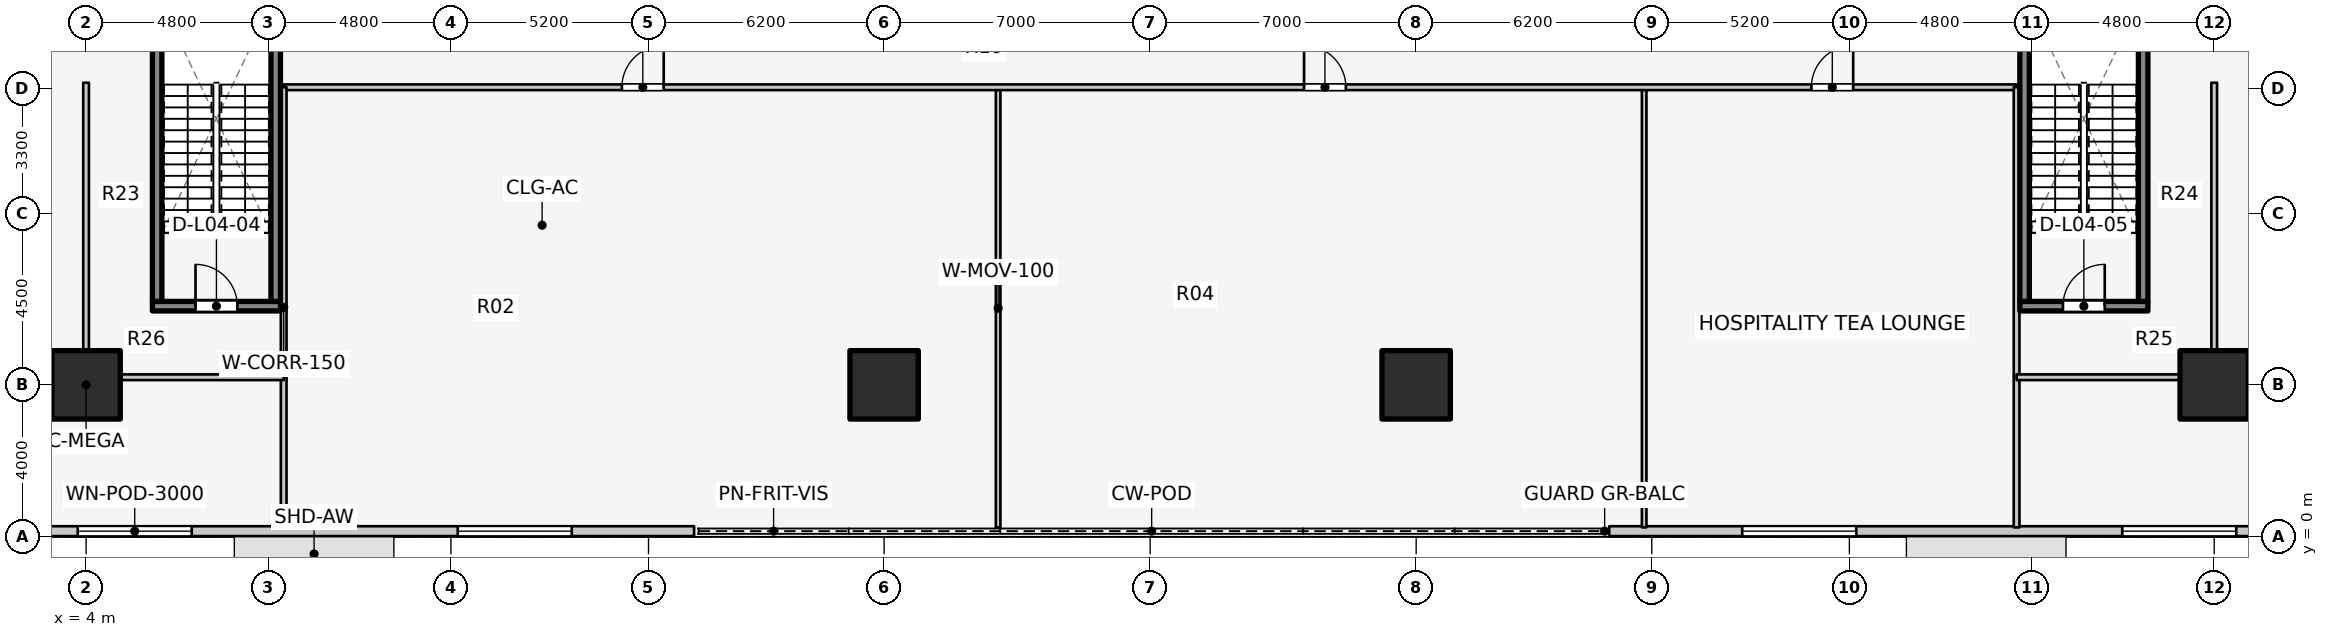
"""IFC4 building model, lengths in metres.
Left out: names, types, materials, properties, quantities, classifications, styles, units other than length and angle.
Written with IfcOpenShell. Run it as: python <this file> out.ifc"""

import sys

from ifc_helpers import new_model, si_unit, direction, frame, frame_2d, origin, origin_2d, place, context, subcontext, project, spatial, rectangle, extrude, element, fill, save


model = new_model("IFC4")
c1 = context("Model", 3, precision=1e-05, world=origin(), true_north=direction((0.0, 1.0)))
c2 = subcontext(c1, "Body", "Model", "MODEL_VIEW")
j1 = project(units=[si_unit("LENGTHUNIT", "METRE"), si_unit("PLANEANGLEUNIT", "RADIAN")], contexts=[c1])
p1 = place(None, origin())
s1 = spatial("IfcSite", under=j1, at=p1, CompositionType="ELEMENT")
p2 = place(p1, origin())
s2 = spatial("IfcBuilding", under=s1, at=p2, CompositionType="ELEMENT")
p3 = place(p2, frame((0.0, 0.0, 13.8)))
s3 = spatial("IfcBuildingStorey", under=s2, at=p3, CompositionType="ELEMENT", Elevation=13.8)
p4 = place(p3, frame((5.745, 6.07, 0.0), z_axis=(0.0, 0.0, 1.0), x_axis=(1.0, 0.0, 0.0)))
e1 = element("IfcWall", 1, at=p4, inside=s3, PredefinedType="SOLIDWALL", context=c2, shape_type="SweptSolid", body=[
    extrude(rectangle(XDim=3.37, YDim=0.25, at=frame_2d((1.685, 0.0))), origin(), (0.0, 0.0, 1.0), 4.6),
])
p5 = place(p4, frame((1.135, 0.0, 0.0)))
e2 = element("IfcOpeningElement", 2, at=p5, cuts=e1, PredefinedType="OPENING", context=c2, shape_type="SweptSolid", body=[
    extrude(rectangle(XDim=1.1, YDim=2.1, at=frame_2d((0.55, 1.05))), frame((0.0, 0.135, 0.0), z_axis=(0.0, -1.0, 0.0), x_axis=(1.0, 0.0, 0.0)), (0.0, 0.0, 1.0), 0.27),
])
for number, where, z_axis, x_axis in (
    (3, (5.87, 6.195, 0.0), (0.0, 0.0, 1.0), (0.0, 1.0, 0.0)),
    (4, (8.99, 6.195, 0.0), (0.0, 0.0, 1.0), (0.0, 1.0, 0.0)),
):
    element("IfcWall", number, at=place(p3, frame(where, z_axis=z_axis, x_axis=x_axis)), inside=s3, PredefinedType="SOLIDWALL", context=c2, shape_type="SweptSolid", body=[
        extrude(rectangle(XDim=7.81, YDim=0.25, at=frame_2d((3.905, 0.0))), origin(), (0.0, 0.0, 1.0), 4.6),
    ])
p6 = place(p3, frame((54.885, 6.07, 0.0), z_axis=(0.0, 0.0, 1.0), x_axis=(1.0, 0.0, 0.0)))
e5 = element("IfcWall", 5, at=p6, inside=s3, PredefinedType="SOLIDWALL", context=c2, shape_type="SweptSolid", body=[
    extrude(rectangle(XDim=3.37, YDim=0.25, at=frame_2d((1.685, 0.0))), origin(), (0.0, 0.0, 1.0), 4.6),
])
p7 = place(p6, frame((1.135, 0.0, 0.0)))
e6 = element("IfcOpeningElement", 6, at=p7, cuts=e5, PredefinedType="OPENING", context=c2, shape_type="SweptSolid", body=[
    extrude(rectangle(XDim=1.1, YDim=2.1, at=frame_2d((0.55, 1.05))), frame((0.0, 0.135, 0.0), z_axis=(0.0, -1.0, 0.0), x_axis=(1.0, 0.0, 0.0)), (0.0, 0.0, 1.0), 0.27),
])
for number, where, z_axis, x_axis in (
    (7, (55.01, 6.195, 0.0), (0.0, 0.0, 1.0), (0.0, 1.0, 0.0)),
    (8, (58.13, 6.195, 0.0), (0.0, 0.0, 1.0), (0.0, 1.0, 0.0)),
):
    element("IfcWall", number, at=place(p3, frame(where, z_axis=z_axis, x_axis=x_axis)), inside=s3, PredefinedType="SOLIDWALL", context=c2, shape_type="SweptSolid", body=[
        extrude(rectangle(XDim=7.81, YDim=0.25, at=frame_2d((3.905, 0.0))), origin(), (0.0, 0.0, 1.0), 4.6),
    ])
for number, where, z_axis, x_axis in (
    (9, (4.0, 4.0, 0.0), (0.0, 0.0, 1.0), (1.0, 0.0, 0.0)),
    (10, (25.0, 4.0, 0.0), (0.0, 0.0, 1.0), (1.0, 0.0, 0.0)),
    (11, (39.0, 4.0, 0.0), (0.0, 0.0, 1.0), (1.0, 0.0, 0.0)),
    (12, (60.0, 4.0, 0.0), (0.0, 0.0, 1.0), (1.0, 0.0, 0.0)),
):
    element("IfcColumn", number, at=place(p3, frame(where, z_axis=z_axis, x_axis=x_axis)), inside=s3, PredefinedType="COLUMN", context=c2, shape_type="SweptSolid", body=[
        extrude(rectangle(XDim=1.8, YDim=1.8, at=origin_2d()), origin(), (0.0, 0.0, 1.0), 4.6),
    ])
p8 = place(p3, frame((0.28, 0.15, 0.0), z_axis=(0.0, 0.0, 1.0), x_axis=(1.0, 0.0, 0.0)))
e13 = element("IfcWall", 13, at=p8, inside=s3, PredefinedType="STANDARD", context=c2, shape_type="SweptSolid", body=[
    extrude(rectangle(XDim=19.72, YDim=0.26, at=frame_2d((9.86, 0.0))), origin(), (0.0, 0.0, 1.0), 4.28),
])
p9 = place(p8, frame((3.5, 0.0, 0.9)))
e14 = element("IfcOpeningElement", 14, at=p9, cuts=e13, PredefinedType="OPENING", context=c2, shape_type="SweptSolid", body=[
    extrude(rectangle(XDim=3.0, YDim=2.4, at=frame_2d((1.5, 1.2))), frame((0.0, 0.14, 0.0), z_axis=(0.0, -1.0, 0.0), x_axis=(1.0, 0.0, 0.0)), (0.0, 0.0, 1.0), 0.28),
])
p10 = place(p8, frame((13.5, 0.0, 0.9)))
e15 = element("IfcOpeningElement", 15, at=p10, cuts=e13, PredefinedType="OPENING", context=c2, shape_type="SweptSolid", body=[
    extrude(rectangle(XDim=3.0, YDim=2.4, at=frame_2d((1.5, 1.2))), frame((0.0, 0.14, 0.0), z_axis=(0.0, -1.0, 0.0), x_axis=(1.0, 0.0, 0.0)), (0.0, 0.0, 1.0), 0.28),
])
p11 = place(p3, frame((44.08, 0.15, 0.0), z_axis=(0.0, 0.0, 1.0), x_axis=(1.0, 0.0, 0.0)))
e16 = element("IfcWall", 16, at=p11, inside=s3, PredefinedType="STANDARD", context=c2, shape_type="SweptSolid", body=[
    extrude(rectangle(XDim=19.64, YDim=0.26, at=frame_2d((9.82, 0.0))), origin(), (0.0, 0.0, 1.0), 4.28),
])
p12 = place(p11, frame((3.5, 0.0, 0.9)))
e17 = element("IfcOpeningElement", 17, at=p12, cuts=e16, PredefinedType="OPENING", context=c2, shape_type="SweptSolid", body=[
    extrude(rectangle(XDim=3.0, YDim=2.4, at=frame_2d((1.5, 1.2))), frame((0.0, 0.14, 0.0), z_axis=(0.0, -1.0, 0.0), x_axis=(1.0, 0.0, 0.0)), (0.0, 0.0, 1.0), 0.28),
])
p13 = place(p11, frame((13.5, 0.0, 0.9)))
e18 = element("IfcOpeningElement", 18, at=p13, cuts=e16, PredefinedType="OPENING", context=c2, shape_type="SweptSolid", body=[
    extrude(rectangle(XDim=3.0, YDim=2.4, at=frame_2d((1.5, 1.2))), frame((0.0, 0.14, 0.0), z_axis=(0.0, -1.0, 0.0), x_axis=(1.0, 0.0, 0.0)), (0.0, 0.0, 1.0), 0.28),
])
for number, where, z_axis, x_axis in (
    (19, (28.0, 0.25, 0.0), (0.0, 0.0, 1.0), (0.0, 1.0, 0.0)),
    (20, (45.0, 0.25, 0.0), (0.0, 0.0, 1.0), (0.0, 1.0, 0.0)),
):
    element("IfcWall", number, at=place(p3, frame(where, z_axis=z_axis, x_axis=x_axis)), inside=s3, PredefinedType="MOVABLE", context=c2, shape_type="SweptSolid", body=[
        extrude(rectangle(XDim=11.53, YDim=0.12, at=frame_2d((5.765, 0.0))), origin(), (0.0, 0.0, 1.0), 3.3),
    ])
p14 = place(p3, frame((9.2, 11.83, 0.0), z_axis=(0.0, 0.0, 1.0), x_axis=(1.0, 0.0, 0.0)))
e21 = element("IfcWall", 21, at=p14, inside=s3, PredefinedType="PARTITIONING", context=c2, shape_type="SweptSolid", body=[
    extrude(rectangle(XDim=45.6, YDim=0.15, at=frame_2d((22.8, 0.0))), origin(), (0.0, 0.0, 1.0), 3.3),
])
p15 = place(p14, frame((8.9, 0.0, 0.0)))
e22 = element("IfcOpeningElement", 22, at=p15, cuts=e21, PredefinedType="OPENING", context=c2, shape_type="SweptSolid", body=[
    extrude(rectangle(XDim=1.1, YDim=2.1, at=frame_2d((0.55, 1.05))), frame((0.0, 0.085, 0.0), z_axis=(0.0, -1.0, 0.0), x_axis=(1.0, 0.0, 0.0)), (0.0, 0.0, 1.0), 0.17),
])
p16 = place(p14, frame((26.85, 0.0, 0.0)))
e23 = element("IfcOpeningElement", 23, at=p16, cuts=e21, PredefinedType="OPENING", context=c2, shape_type="SweptSolid", body=[
    extrude(rectangle(XDim=1.1, YDim=2.1, at=frame_2d((0.55, 1.05))), frame((0.0, 0.085, 0.0), z_axis=(0.0, -1.0, 0.0), x_axis=(1.0, 0.0, 0.0)), (0.0, 0.0, 1.0), 0.17),
])
p17 = place(p14, frame((40.2, 0.0, 0.0)))
e24 = element("IfcOpeningElement", 24, at=p17, cuts=e21, PredefinedType="OPENING", context=c2, shape_type="SweptSolid", body=[
    extrude(rectangle(XDim=1.1, YDim=2.1, at=frame_2d((0.55, 1.05))), frame((0.0, 0.085, 0.0), z_axis=(0.0, -1.0, 0.0), x_axis=(1.0, 0.0, 0.0)), (0.0, 0.0, 1.0), 0.17),
])
for number, where, z_axis, x_axis in (
    (25, (9.2, 0.25, 0.0), (0.0, 0.0, 1.0), (0.0, 1.0, 0.0)),
    (26, (54.8, 0.25, 0.0), (0.0, 0.0, 1.0), (0.0, 1.0, 0.0)),
):
    element("IfcWall", number, at=place(p3, frame(where, z_axis=z_axis, x_axis=x_axis)), inside=s3, PredefinedType="PARTITIONING", context=c2, shape_type="SweptSolid", body=[
        extrude(rectangle(XDim=11.58, YDim=0.15, at=frame_2d((5.79, 0.0))), origin(), (0.0, 0.0, 1.0), 3.3),
    ])
p18 = place(p3, frame((4.0, 4.2, 0.0), z_axis=(0.0, 0.0, 1.0), x_axis=(0.0, 1.0, 0.0)))
e27 = element("IfcWall", 27, at=p18, inside=s3, PredefinedType="PARTITIONING", context=c2, shape_type="SweptSolid", body=[
    extrude(rectangle(XDim=7.75, YDim=0.15, at=frame_2d((3.875, 0.0))), origin(), (0.0, 0.0, 1.0), 3.3),
])
p19 = place(p3, frame((4.0, 4.2, 0.0), z_axis=(0.0, 0.0, 1.0), x_axis=(1.0, 0.0, 0.0)))
e28 = element("IfcWall", 28, at=p19, inside=s3, PredefinedType="PARTITIONING", context=c2, shape_type="SweptSolid", body=[
    extrude(rectangle(XDim=5.2, YDim=0.15, at=frame_2d((2.6, 0.0))), origin(), (0.0, 0.0, 1.0), 3.3),
])
p20 = place(p3, frame((60.0, 4.2, 0.0), z_axis=(0.0, 0.0, 1.0), x_axis=(0.0, 1.0, 0.0)))
e29 = element("IfcWall", 29, at=p20, inside=s3, PredefinedType="PARTITIONING", context=c2, shape_type="SweptSolid", body=[
    extrude(rectangle(XDim=7.75, YDim=0.15, at=frame_2d((3.875, 0.0))), origin(), (0.0, 0.0, 1.0), 3.3),
])
p21 = place(p3, frame((54.8, 4.2, 0.0), z_axis=(0.0, 0.0, 1.0), x_axis=(1.0, 0.0, 0.0)))
e30 = element("IfcWall", 30, at=p21, inside=s3, PredefinedType="PARTITIONING", context=c2, shape_type="SweptSolid", body=[
    extrude(rectangle(XDim=5.2, YDim=0.15, at=frame_2d((2.6, 0.0))), origin(), (0.0, 0.0, 1.0), 3.3),
])
p22 = place(p9, origin())
e31 = element("IfcWindow", 31, at=p22, inside=s3, PartitioningType="SINGLE_PANEL", PredefinedType="WINDOW", context=c2, shape_type="SweptSolid", body=[
    extrude(rectangle(XDim=3.0, YDim=2.4, at=frame_2d((1.5, 1.2))), frame((0.0, 0.03, 0.0), z_axis=(0.0, -1.0, 0.0), x_axis=(1.0, 0.0, 0.0)), (0.0, 0.0, 1.0), 0.06),
])
fill(e14, e31)
p23 = place(p10, origin())
e32 = element("IfcWindow", 32, at=p23, inside=s3, PartitioningType="SINGLE_PANEL", PredefinedType="WINDOW", context=c2, shape_type="SweptSolid", body=[
    extrude(rectangle(XDim=3.0, YDim=2.4, at=frame_2d((1.5, 1.2))), frame((0.0, 0.03, 0.0), z_axis=(0.0, -1.0, 0.0), x_axis=(1.0, 0.0, 0.0)), (0.0, 0.0, 1.0), 0.06),
])
fill(e15, e32)
p24 = place(p12, origin())
e33 = element("IfcWindow", 33, at=p24, inside=s3, PartitioningType="SINGLE_PANEL", PredefinedType="WINDOW", context=c2, shape_type="SweptSolid", body=[
    extrude(rectangle(XDim=3.0, YDim=2.4, at=frame_2d((1.5, 1.2))), frame((0.0, 0.03, 0.0), z_axis=(0.0, -1.0, 0.0), x_axis=(1.0, 0.0, 0.0)), (0.0, 0.0, 1.0), 0.06),
])
fill(e17, e33)
p25 = place(p13, origin())
e34 = element("IfcWindow", 34, at=p25, inside=s3, PartitioningType="SINGLE_PANEL", PredefinedType="WINDOW", context=c2, shape_type="SweptSolid", body=[
    extrude(rectangle(XDim=3.0, YDim=2.4, at=frame_2d((1.5, 1.2))), frame((0.0, 0.03, 0.0), z_axis=(0.0, -1.0, 0.0), x_axis=(1.0, 0.0, 0.0)), (0.0, 0.0, 1.0), 0.06),
])
fill(e18, e34)
p26 = place(p5, origin())
e35 = element("IfcDoor", 35, at=p26, inside=s3, OperationType="SINGLE_SWING_LEFT", PredefinedType="DOOR", context=c2, shape_type="SweptSolid", body=[
    extrude(rectangle(XDim=1.1, YDim=2.1, at=frame_2d((0.55, 1.05))), frame((0.0, 0.025, 0.0), z_axis=(0.0, -1.0, 0.0), x_axis=(1.0, 0.0, 0.0)), (0.0, 0.0, 1.0), 0.05),
])
fill(e2, e35)
p27 = place(p7, origin())
e36 = element("IfcDoor", 36, at=p27, inside=s3, OperationType="SINGLE_SWING_RIGHT", PredefinedType="DOOR", context=c2, shape_type="SweptSolid", body=[
    extrude(rectangle(XDim=1.1, YDim=2.1, at=frame_2d((0.55, 1.05))), frame((0.0, 0.025, 0.0), z_axis=(0.0, -1.0, 0.0), x_axis=(1.0, 0.0, 0.0)), (0.0, 0.0, 1.0), 0.05),
])
fill(e6, e36)
p28 = place(p15, origin())
e37 = element("IfcDoor", 37, at=p28, inside=s3, OperationType="SINGLE_SWING_RIGHT", PredefinedType="DOOR", context=c2, shape_type="SweptSolid", body=[
    extrude(rectangle(XDim=1.1, YDim=2.1, at=frame_2d((0.55, 1.05))), frame((0.0, 0.025, 0.0), z_axis=(0.0, -1.0, 0.0), x_axis=(1.0, 0.0, 0.0)), (0.0, 0.0, 1.0), 0.05),
])
fill(e22, e37)
p29 = place(p16, origin())
e38 = element("IfcDoor", 38, at=p29, inside=s3, OperationType="SINGLE_SWING_LEFT", PredefinedType="DOOR", context=c2, shape_type="SweptSolid", body=[
    extrude(rectangle(XDim=1.1, YDim=2.1, at=frame_2d((0.55, 1.05))), frame((0.0, 0.025, 0.0), z_axis=(0.0, -1.0, 0.0), x_axis=(1.0, 0.0, 0.0)), (0.0, 0.0, 1.0), 0.05),
])
fill(e23, e38)
p30 = place(p17, origin())
e39 = element("IfcDoor", 39, at=p30, inside=s3, OperationType="SINGLE_SWING_RIGHT", PredefinedType="DOOR", context=c2, shape_type="SweptSolid", body=[
    extrude(rectangle(XDim=1.1, YDim=2.1, at=frame_2d((0.55, 1.05))), frame((0.0, 0.025, 0.0), z_axis=(0.0, -1.0, 0.0), x_axis=(1.0, 0.0, 0.0)), (0.0, 0.0, 1.0), 0.05),
])
fill(e24, e39)
save(model, sys.argv[1])
